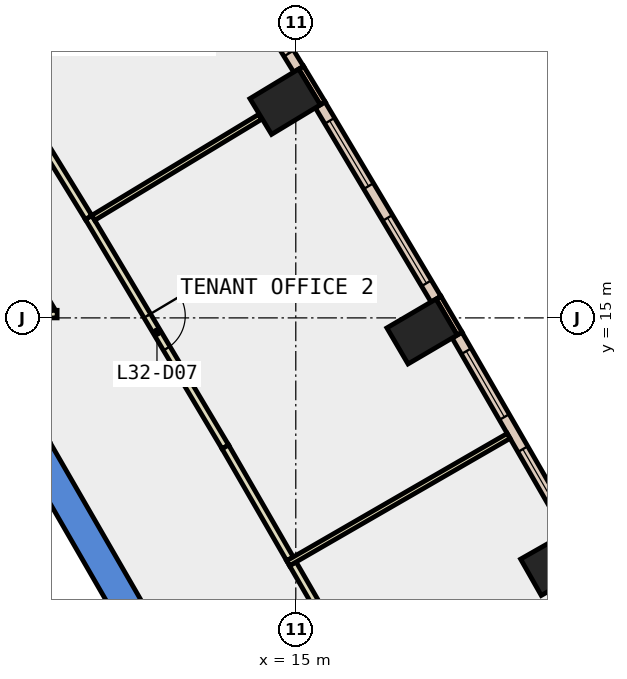
"""IFC4 building model, lengths in metres.
Left out: names, types, materials, properties, quantities, classifications, styles, units other than length and angle.
Written with IfcOpenShell. Run it as: python <this file> out.ifc"""

import sys

from ifc_helpers import new_model, si_unit, direction, frame, frame_2d, origin, origin_2d, place, context, subcontext, project, spatial, polyline, rectangle, outline, extrude, element, fill, save


model = new_model("IFC4")
c1 = context("Model", 3, precision=1e-05, world=origin(), true_north=direction((0.0, 1.0)))
c2 = subcontext(c1, "Body", "Model", "MODEL_VIEW")
j1 = project(units=[si_unit("LENGTHUNIT", "METRE"), si_unit("PLANEANGLEUNIT", "RADIAN")], contexts=[c1])
p1 = place(None, origin())
s1 = spatial("IfcSite", under=j1, at=p1, CompositionType="ELEMENT")
p2 = place(p1, origin())
s2 = spatial("IfcBuilding", under=s1, at=p2, CompositionType="ELEMENT")
p3 = place(p2, frame((0.0, 0.0, 146.6)))
s3 = spatial("IfcBuildingStorey", under=s2, at=p3, CompositionType="ELEMENT", Elevation=146.6)
for number, where, z_axis, x_axis in (
    (1, (21.84, 8.546, -0.4), (0.0, 0.0, 1.0), (-0.494, 0.869, 0.0)),
    (2, (18.322, 14.642, -0.4), (0.0, 0.0, 1.0), (-0.506, 0.863, 0.0)),
    (3, (14.719, 20.688, -0.4), (0.0, 0.0, 1.0), (-0.518, 0.855, 0.0)),
):
    element("IfcColumn", number, at=place(p3, frame(where, z_axis=z_axis, x_axis=x_axis)), inside=s3, PredefinedType="COLUMN", context=c2, shape_type="SweptSolid", body=[
        extrude(rectangle(XDim=1.1, YDim=1.5, at=origin_2d()), origin(), (0.0, 0.0, 1.0), 4.2),
    ])
p4 = place(p3, frame((0.0, 0.0, -0.4)))
e4 = element("IfcWall", 4, at=p4, inside=s3, PredefinedType="SHEAR", context=c2, shape_type="SweptSolid", body=[
    extrude(outline(polyline([(8.517, 11.748), (7.824, 11.348), (12.933, 2.5), (13.856, 2.5), (8.517, 11.748)])), origin(), (0.0, 0.0, 1.0), 4.2),
])
p5 = place(p3, frame((19.312, 14.585, 0.0), z_axis=(0.0, 0.0, 1.0), x_axis=(-0.50667077411, 0.862139621327, 0.0)))
e5 = element("IfcWall", 5, at=p5, inside=s3, PredefinedType="STANDARD", context=c2, shape_type="SweptSolid", body=[
    extrude(rectangle(XDim=1.1, YDim=0.15, at=frame_2d((0.55, 0.0))), origin(), (0.0, 0.0, 1.0), 3.8),
])
p6 = place(p3, frame((15.71, 20.645, 0.0), z_axis=(0.0, 0.0, 1.0), x_axis=(-0.518178754102, 0.855272341888, 0.0)))
e6 = element("IfcWall", 6, at=p6, inside=s3, PredefinedType="STANDARD", context=c2, shape_type="SweptSolid", body=[
    extrude(rectangle(XDim=1.1, YDim=0.15, at=frame_2d((0.55, 0.0))), origin(), (0.0, 0.0, 1.0), 3.8),
])
p7 = place(p3, frame((22.218, 9.392, 0.0), z_axis=(0.0, 0.0, 1.0), x_axis=(-0.49994263896, 0.866058518664, 0.0)))
e7 = element("IfcWall", 7, at=p7, inside=s3, PredefinedType="STANDARD", context=c2, shape_type="SweptSolid", body=[
    extrude(rectangle(XDim=5.951, YDim=0.3, at=frame_2d((2.976, 0.0))), origin(), (0.0, 0.0, 1.0), 3.8),
])
p8 = place(p7, frame((0.488, 0.0, 0.9)))
e8 = element("IfcOpeningElement", 8, at=p8, cuts=e7, PredefinedType="OPENING", context=c2, shape_type="SweptSolid", body=[
    extrude(rectangle(XDim=2.0, YDim=2.6, at=frame_2d((1.0, 1.3))), frame((0.0, 0.16, 0.0), z_axis=(0.0, -1.0, 0.0), x_axis=(1.0, 0.0, 0.0)), (0.0, 0.0, 1.0), 0.32),
])
p9 = place(p7, frame((3.463, 0.0, 0.9)))
e9 = element("IfcOpeningElement", 9, at=p9, cuts=e7, PredefinedType="OPENING", context=c2, shape_type="SweptSolid", body=[
    extrude(rectangle(XDim=2.0, YDim=2.6, at=frame_2d((1.0, 1.3))), frame((0.0, 0.16, 0.0), z_axis=(0.0, -1.0, 0.0), x_axis=(1.0, 0.0, 0.0)), (0.0, 0.0, 1.0), 0.32),
])
p10 = place(p3, frame((18.688, 15.493, 0.0), z_axis=(0.0, 0.0, 1.0), x_axis=(-0.511856715331, 0.859070836992, 0.0)))
e10 = element("IfcWall", 10, at=p10, inside=s3, PredefinedType="STANDARD", context=c2, shape_type="SweptSolid", body=[
    extrude(rectangle(XDim=5.951, YDim=0.3, at=frame_2d((2.975, 0.0))), origin(), (0.0, 0.0, 1.0), 3.8),
])
p11 = place(p10, frame((0.488, 0.0, 0.9)))
e11 = element("IfcOpeningElement", 11, at=p11, cuts=e10, PredefinedType="OPENING", context=c2, shape_type="SweptSolid", body=[
    extrude(rectangle(XDim=2.0, YDim=2.6, at=frame_2d((1.0, 1.3))), frame((0.0, 0.16, 0.0), z_axis=(0.0, -1.0, 0.0), x_axis=(1.0, 0.0, 0.0)), (0.0, 0.0, 1.0), 0.32),
])
p12 = place(p10, frame((3.463, 0.0, 0.9)))
e12 = element("IfcOpeningElement", 12, at=p12, cuts=e10, PredefinedType="OPENING", context=c2, shape_type="SweptSolid", body=[
    extrude(rectangle(XDim=2.0, YDim=2.6, at=frame_2d((1.0, 1.3))), frame((0.0, 0.16, 0.0), z_axis=(0.0, -1.0, 0.0), x_axis=(1.0, 0.0, 0.0)), (0.0, 0.0, 1.0), 0.32),
])
p13 = place(p3, frame((15.073, 21.544, 0.0), z_axis=(0.0, 0.0, 1.0), x_axis=(-0.523719731127, 0.851890628677, 0.0)))
e13 = element("IfcWall", 13, at=p13, inside=s3, PredefinedType="STANDARD", context=c2, shape_type="SweptSolid", body=[
    extrude(rectangle(XDim=5.952, YDim=0.3, at=frame_2d((2.976, 0.0))), origin(), (0.0, 0.0, 1.0), 3.8),
])
p14 = place(p13, frame((0.488, 0.0, 0.9)))
e14 = element("IfcOpeningElement", 14, at=p14, cuts=e13, PredefinedType="OPENING", context=c2, shape_type="SweptSolid", body=[
    extrude(rectangle(XDim=2.0, YDim=2.6, at=frame_2d((1.0, 1.3))), frame((0.0, 0.16, 0.0), z_axis=(0.0, -1.0, 0.0), x_axis=(1.0, 0.0, 0.0)), (0.0, 0.0, 1.0), 0.32),
])
p15 = place(p13, frame((3.464, 0.0, 0.9)))
e15 = element("IfcOpeningElement", 15, at=p15, cuts=e13, PredefinedType="OPENING", context=c2, shape_type="SweptSolid", body=[
    extrude(rectangle(XDim=2.0, YDim=2.6, at=frame_2d((1.0, 1.3))), frame((0.0, 0.16, 0.0), z_axis=(0.0, -1.0, 0.0), x_axis=(1.0, 0.0, 0.0)), (0.0, 0.0, 1.0), 0.32),
])
p16 = place(p3, frame((6.484, 15.1, 0.0), z_axis=(0.0, 0.0, 1.0), x_axis=(1.0, 0.0, 0.0)))
e16 = element("IfcWall", 16, at=p16, inside=s3, PredefinedType="PARTITIONING", context=c2, shape_type="SweptSolid", body=[
    extrude(rectangle(XDim=2.236, YDim=0.2, at=frame_2d((1.118, 0.0))), origin(), (0.0, 0.0, 1.0), 3.8),
])
p17 = place(p3, frame((8.569, 15.186, 0.0), z_axis=(0.0, 0.0, 1.0), x_axis=(-0.512230585803, 0.85884796499, 0.0)))
e17 = element("IfcWall", 17, at=p17, inside=s3, PredefinedType="PARTITIONING", context=c2, shape_type="SweptSolid", body=[
    extrude(rectangle(XDim=1.523, YDim=0.2, at=frame_2d((0.761, 0.0))), origin(), (0.0, 0.0, 1.0), 3.8),
])
p18 = place(p3, frame((14.922, 8.529, 0.0), z_axis=(0.0, 0.0, 1.0), x_axis=(0.500097109062, -0.865969330582, 0.0)))
e18 = element("IfcWall", 18, at=p18, inside=s3, PredefinedType="PARTITIONING", context=c2, shape_type="SweptSolid", body=[
    extrude(rectangle(XDim=3.403, YDim=0.2, at=frame_2d((1.702, 0.0))), origin(), (0.0, 0.0, 1.0), 3.8),
])
p19 = place(p3, frame((9.548, 17.645, 0.0), z_axis=(0.0, 0.0, 1.0), x_axis=(0.511822081848, -0.859091471575, 0.0)))
e19 = element("IfcWall", 19, at=p19, inside=s3, PredefinedType="PARTITIONING", context=c2, shape_type="SweptSolid", body=[
    extrude(rectangle(XDim=7.03, YDim=0.2, at=frame_2d((3.515, 0.0))), origin(), (0.0, 0.0, 1.0), 3.8),
])
p20 = place(p19, frame((3.015, 0.0, 0.0)))
e20 = element("IfcOpeningElement", 20, at=p20, cuts=e19, PredefinedType="OPENING", context=c2, shape_type="SweptSolid", body=[
    extrude(rectangle(XDim=1.0, YDim=2.1, at=frame_2d((0.5, 1.05))), frame((0.0, 0.11, 0.0), z_axis=(0.0, -1.0, 0.0), x_axis=(1.0, 0.0, 0.0)), (0.0, 0.0, 1.0), 0.22),
])
p21 = place(p3, frame((13.146, 11.606, 0.0), z_axis=(0.0, 0.0, 1.0), x_axis=(0.499881871653, -0.866093594476, 0.0)))
e21 = element("IfcWall", 21, at=p21, inside=s3, PredefinedType="PARTITIONING", context=c2, shape_type="SweptSolid", body=[
    extrude(rectangle(XDim=3.403, YDim=0.2, at=frame_2d((1.701, 0.0))), origin(), (0.0, 0.0, 1.0), 3.8),
])
p22 = place(p3, frame((5.904, 23.571, 0.0), z_axis=(0.0, 0.0, 1.0), x_axis=(0.523647026552, -0.851935321244, 0.0)))
e22 = element("IfcWall", 22, at=p22, inside=s3, PredefinedType="PARTITIONING", context=c2, shape_type="SweptSolid", body=[
    extrude(rectangle(XDim=6.957, YDim=0.2, at=frame_2d((3.479, 0.0))), origin(), (0.0, 0.0, 1.0), 3.8),
])
p23 = place(p22, frame((3.053, 0.0, 0.0)))
e23 = element("IfcOpeningElement", 23, at=p23, cuts=e22, PredefinedType="OPENING", context=c2, shape_type="SweptSolid", body=[
    extrude(rectangle(XDim=1.0, YDim=2.1, at=frame_2d((0.5, 1.05))), frame((0.0, 0.11, 0.0), z_axis=(0.0, -1.0, 0.0), x_axis=(1.0, 0.0, 0.0)), (0.0, 0.0, 1.0), 0.22),
])
p24 = place(p3, frame((14.798, 8.544, 0.0), z_axis=(0.0, 0.0, 1.0), x_axis=(0.866041788654, 0.4999716195, 0.0)))
e24 = element("IfcWall", 24, at=p24, inside=s3, PredefinedType="PARTITIONING", context=c2, shape_type="SweptSolid", body=[
    extrude(rectangle(XDim=6.701, YDim=0.15, at=frame_2d((3.35, 0.0))), origin(), (0.0, 0.0, 1.0), 3.8),
])
p25 = place(p3, frame((9.671, 17.633, 0.0), z_axis=(0.0, 0.0, 1.0), x_axis=(0.855551112805, 0.517718353332, 0.0)))
e25 = element("IfcWall", 25, at=p25, inside=s3, PredefinedType="PARTITIONING", context=c2, shape_type="SweptSolid", body=[
    extrude(rectangle(XDim=5.13, YDim=0.15, at=frame_2d((2.565, 0.0))), origin(), (0.0, 0.0, 1.0), 3.8),
])
p26 = place(p8, origin())
e26 = element("IfcWindow", 26, at=p26, inside=s3, PartitioningType="SINGLE_PANEL", PredefinedType="WINDOW", context=c2, shape_type="SweptSolid", body=[
    extrude(rectangle(XDim=2.0, YDim=2.6, at=frame_2d((1.0, 1.3))), frame((0.0, 0.03, 0.0), z_axis=(0.0, -1.0, 0.0), x_axis=(1.0, 0.0, 0.0)), (0.0, 0.0, 1.0), 0.06),
])
fill(e8, e26)
p27 = place(p9, origin())
e27 = element("IfcWindow", 27, at=p27, inside=s3, PartitioningType="SINGLE_PANEL", PredefinedType="WINDOW", context=c2, shape_type="SweptSolid", body=[
    extrude(rectangle(XDim=2.0, YDim=2.6, at=frame_2d((1.0, 1.3))), frame((0.0, 0.03, 0.0), z_axis=(0.0, -1.0, 0.0), x_axis=(1.0, 0.0, 0.0)), (0.0, 0.0, 1.0), 0.06),
])
fill(e9, e27)
p28 = place(p11, origin())
e28 = element("IfcWindow", 28, at=p28, inside=s3, PartitioningType="SINGLE_PANEL", PredefinedType="WINDOW", context=c2, shape_type="SweptSolid", body=[
    extrude(rectangle(XDim=2.0, YDim=2.6, at=frame_2d((1.0, 1.3))), frame((0.0, 0.03, 0.0), z_axis=(0.0, -1.0, 0.0), x_axis=(1.0, 0.0, 0.0)), (0.0, 0.0, 1.0), 0.06),
])
fill(e11, e28)
p29 = place(p12, origin())
e29 = element("IfcWindow", 29, at=p29, inside=s3, PartitioningType="SINGLE_PANEL", PredefinedType="WINDOW", context=c2, shape_type="SweptSolid", body=[
    extrude(rectangle(XDim=2.0, YDim=2.6, at=frame_2d((1.0, 1.3))), frame((0.0, 0.03, 0.0), z_axis=(0.0, -1.0, 0.0), x_axis=(1.0, 0.0, 0.0)), (0.0, 0.0, 1.0), 0.06),
])
fill(e12, e29)
p30 = place(p14, origin())
e30 = element("IfcWindow", 30, at=p30, inside=s3, PartitioningType="SINGLE_PANEL", PredefinedType="WINDOW", context=c2, shape_type="SweptSolid", body=[
    extrude(rectangle(XDim=2.0, YDim=2.6, at=frame_2d((1.0, 1.3))), frame((0.0, 0.03, 0.0), z_axis=(0.0, -1.0, 0.0), x_axis=(1.0, 0.0, 0.0)), (0.0, 0.0, 1.0), 0.06),
])
fill(e14, e30)
p31 = place(p20, origin())
e31 = element("IfcDoor", 31, at=p31, inside=s3, OperationType="SINGLE_SWING_RIGHT", PredefinedType="DOOR", context=c2, shape_type="SweptSolid", body=[
    extrude(rectangle(XDim=1.0, YDim=2.1, at=frame_2d((0.5, 1.05))), frame((0.0, 0.025, 0.0), z_axis=(0.0, -1.0, 0.0), x_axis=(1.0, 0.0, 0.0)), (0.0, 0.0, 1.0), 0.05),
])
fill(e20, e31)
save(model, sys.argv[1])
